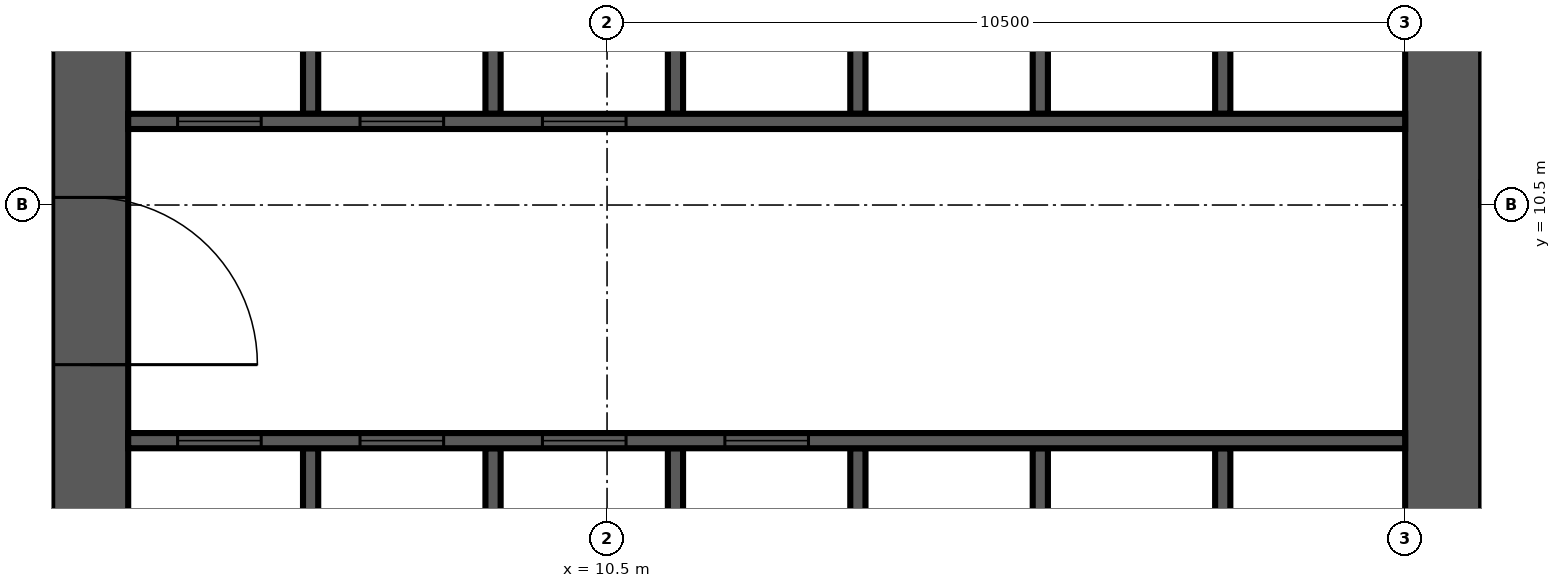
"""IFC4 building model, lengths in metres.
Left out: names, types, materials, properties, quantities, classifications, styles, units other than length and angle.
Written with IfcOpenShell. Run it as: python <this file> out.ifc"""

import sys

from ifc_helpers import new_model, si_unit, direction, frame, frame_2d, origin, place, context, subcontext, project, spatial, rectangle, extrude, source, transform, mapped, element, fill, save


model = new_model("IFC4")
c1 = context("Model", 3, precision=1e-05, world=origin(), true_north=direction((0.0, 1.0)))
c2 = subcontext(c1, "Body", "Model", "MODEL_VIEW")
j1 = project(units=[si_unit("LENGTHUNIT", "METRE"), si_unit("PLANEANGLEUNIT", "RADIAN")], contexts=[c1])
p1 = place(None, origin())
s1 = spatial("IfcSite", under=j1, at=p1, CompositionType="ELEMENT")
p2 = place(p1, origin())
s2 = spatial("IfcBuilding", under=s1, at=p2, CompositionType="ELEMENT")
p3 = place(p2, frame((0.0, 0.0, 103.5)))
s3 = spatial("IfcBuildingStorey", under=s2, at=p3, CompositionType="ELEMENT", Elevation=103.5)
p4 = place(p3, frame((3.7, 4.2, 0.0), z_axis=(0.0, 0.0, 1.0), x_axis=(0.0, 1.0, 0.0)))
e1 = element("IfcWall", 1, at=p4, inside=s3, PredefinedType="SHEAR", context=c2, shape_type="SweptSolid", body=[
    extrude(rectangle(XDim=17.8, YDim=1.0, at=frame_2d((8.9, 0.0))), origin(), (0.0, 0.0, 1.0), 4.2),
])
p5 = place(p4, frame((4.2, 0.0, 0.0)))
e2 = element("IfcOpeningElement", 2, at=p5, cuts=e1, PredefinedType="OPENING", context=c2, shape_type="SweptSolid", body=[
    extrude(rectangle(XDim=2.2, YDim=2.1, at=frame_2d((1.1, 1.05))), frame((0.0, 0.51, 0.0), z_axis=(0.0, -1.0, 0.0), x_axis=(1.0, 0.0, 0.0)), (0.0, 0.0, 1.0), 1.02),
])
p6 = place(p4, frame((10.95, 0.0, 0.0)))
e3 = element("IfcOpeningElement", 3, at=p6, cuts=e1, PredefinedType="OPENING", context=c2, shape_type="SweptSolid", body=[
    extrude(rectangle(XDim=0.9, YDim=2.1, at=frame_2d((0.45, 1.05))), frame((0.0, 0.51, 0.0), z_axis=(0.0, -1.0, 0.0), x_axis=(1.0, 0.0, 0.0)), (0.0, 0.0, 1.0), 1.02),
])
p7 = place(p3, frame((21.5, 4.2, 0.0), z_axis=(0.0, 0.0, 1.0), x_axis=(0.0, 1.0, 0.0)))
e4 = element("IfcWall", 4, at=p7, inside=s3, PredefinedType="SHEAR", context=c2, shape_type="SweptSolid", body=[
    extrude(rectangle(XDim=16.8, YDim=1.0, at=frame_2d((8.4, 0.0))), origin(), (0.0, 0.0, 1.0), 4.2),
])
m1 = source(origin(), c2, "Body", "SweptSolid", [
    extrude(rectangle(XDim=1.2, YDim=2.1, at=frame_2d((0.6, 1.05))), frame((0.0, 0.51, 0.0), z_axis=(0.0, -1.0, 0.0), x_axis=(1.0, 0.0, 0.0)), (0.0, 0.0, 1.0), 1.02),
])
p8 = place(p7, frame((14.7, 0.0, 0.0)))
e5 = element("IfcOpeningElement", 5, at=p8, cuts=e4, PredefinedType="OPENING", context=c2, shape_type="MappedRepresentation", body=[
    mapped(m1, transform((0.0, 0.0, 0.0), scale=1.0)),
])
m2 = source(origin(), c2, "Body", "SweptSolid", [
    extrude(rectangle(XDim=3.1, YDim=0.2, at=frame_2d((1.55, 0.0))), origin(), (0.0, 0.0, 1.0), 4.2),
])
for number, where, z_axis, x_axis in (
    (6, (6.6, 4.2, 0.0), (0.0, 0.0, 1.0), (0.0, 1.0, 0.0)),
    (7, (9.0, 4.2, 0.0), (0.0, 0.0, 1.0), (0.0, 1.0, 0.0)),
    (8, (11.4, 4.2, 0.0), (0.0, 0.0, 1.0), (0.0, 1.0, 0.0)),
    (9, (13.8, 4.2, 0.0), (0.0, 0.0, 1.0), (0.0, 1.0, 0.0)),
    (10, (16.2, 4.2, 0.0), (0.0, 0.0, 1.0), (0.0, 1.0, 0.0)),
    (11, (18.6, 4.2, 0.0), (0.0, 0.0, 1.0), (0.0, 1.0, 0.0)),
):
    element("IfcWall", number, at=place(p3, frame(where, z_axis=z_axis, x_axis=x_axis)), inside=s3, PredefinedType="SOLIDWALL", context=c2, shape_type="MappedRepresentation", body=[
        mapped(m2, transform((0.0, 0.0, 0.0), scale=1.0)),
    ])
m3 = source(origin(), c2, "Body", "SweptSolid", [
    extrude(rectangle(XDim=3.0, YDim=0.2, at=frame_2d((1.5, 0.0))), origin(), (0.0, 0.0, 1.0), 4.2),
])
for number, where, z_axis, x_axis in (
    (12, (6.6, 11.7, 0.0), (0.0, 0.0, 1.0), (0.0, 1.0, 0.0)),
    (13, (9.0, 11.7, 0.0), (0.0, 0.0, 1.0), (0.0, 1.0, 0.0)),
    (14, (11.4, 11.7, 0.0), (0.0, 0.0, 1.0), (0.0, 1.0, 0.0)),
    (15, (13.8, 11.7, 0.0), (0.0, 0.0, 1.0), (0.0, 1.0, 0.0)),
    (16, (16.2, 11.7, 0.0), (0.0, 0.0, 1.0), (0.0, 1.0, 0.0)),
    (17, (18.6, 11.7, 0.0), (0.0, 0.0, 1.0), (0.0, 1.0, 0.0)),
):
    element("IfcWall", number, at=place(p3, frame(where, z_axis=z_axis, x_axis=x_axis)), inside=s3, PredefinedType="SOLIDWALL", context=c2, shape_type="MappedRepresentation", body=[
        mapped(m3, transform((0.0, 0.0, 0.0), scale=1.0)),
    ])
m4 = source(origin(), c2, "Body", "SweptSolid", [
    extrude(rectangle(XDim=16.8, YDim=0.2, at=frame_2d((8.4, 0.0))), origin(), (0.0, 0.0, 1.0), 4.2),
])
p9 = place(p3, frame((4.2, 7.4, 0.0), z_axis=(0.0, 0.0, 1.0), x_axis=(1.0, 0.0, 0.0)))
e18 = element("IfcWall", 18, at=p9, inside=s3, PredefinedType="SOLIDWALL", context=c2, shape_type="MappedRepresentation", body=[
    mapped(m4, transform((0.0, 0.0, 0.0), scale=1.0)),
])
m5 = source(origin(), c2, "Body", "SweptSolid", [
    extrude(rectangle(XDim=1.1, YDim=2.1, at=frame_2d((0.55, 1.05))), frame((0.0, 0.11, 0.0), z_axis=(0.0, -1.0, 0.0), x_axis=(1.0, 0.0, 0.0)), (0.0, 0.0, 1.0), 0.22),
])
p10 = place(p9, frame((0.65, 0.0, 0.0)))
e19 = element("IfcOpeningElement", 19, at=p10, cuts=e18, PredefinedType="OPENING", context=c2, shape_type="MappedRepresentation", body=[
    mapped(m5, transform((0.0, 0.0, 0.0), scale=1.0)),
])
p11 = place(p9, frame((3.05, 0.0, 0.0)))
e20 = element("IfcOpeningElement", 20, at=p11, cuts=e18, PredefinedType="OPENING", context=c2, shape_type="MappedRepresentation", body=[
    mapped(m5, transform((0.0, 0.0, 0.0), scale=1.0)),
])
p12 = place(p9, frame((5.45, 0.0, 0.0)))
e21 = element("IfcOpeningElement", 21, at=p12, cuts=e18, PredefinedType="OPENING", context=c2, shape_type="MappedRepresentation", body=[
    mapped(m5, transform((0.0, 0.0, 0.0), scale=1.0)),
])
p13 = place(p9, frame((7.85, 0.0, 0.0)))
e22 = element("IfcOpeningElement", 22, at=p13, cuts=e18, PredefinedType="OPENING", context=c2, shape_type="MappedRepresentation", body=[
    mapped(m5, transform((0.0, 0.0, 0.0), scale=1.0)),
])
p14 = place(p3, frame((4.2, 11.6, 0.0), z_axis=(0.0, 0.0, 1.0), x_axis=(1.0, 0.0, 0.0)))
e23 = element("IfcWall", 23, at=p14, inside=s3, PredefinedType="SOLIDWALL", context=c2, shape_type="MappedRepresentation", body=[
    mapped(m4, transform((0.0, 0.0, 0.0), scale=1.0)),
])
p15 = place(p14, frame((0.65, 0.0, 0.0)))
e24 = element("IfcOpeningElement", 24, at=p15, cuts=e23, PredefinedType="OPENING", context=c2, shape_type="MappedRepresentation", body=[
    mapped(m5, transform((0.0, 0.0, 0.0), scale=1.0)),
])
p16 = place(p14, frame((3.05, 0.0, 0.0)))
e25 = element("IfcOpeningElement", 25, at=p16, cuts=e23, PredefinedType="OPENING", context=c2, shape_type="MappedRepresentation", body=[
    mapped(m5, transform((0.0, 0.0, 0.0), scale=1.0)),
])
p17 = place(p14, frame((5.45, 0.0, 0.0)))
e26 = element("IfcOpeningElement", 26, at=p17, cuts=e23, PredefinedType="OPENING", context=c2, shape_type="MappedRepresentation", body=[
    mapped(m5, transform((0.0, 0.0, 0.0), scale=1.0)),
])
m6 = source(origin(), c2, "Body", "SweptSolid", [
    extrude(rectangle(XDim=1.1, YDim=2.1, at=frame_2d((0.55, 1.05))), frame((0.0, 0.025, 0.0), z_axis=(0.0, -1.0, 0.0), x_axis=(1.0, 0.0, 0.0)), (0.0, 0.0, 1.0), 0.05),
])
p18 = place(p10, origin())
e27 = element("IfcDoor", 27, at=p18, inside=s3, OperationType="SLIDING_TO_LEFT", PredefinedType="DOOR", context=c2, shape_type="MappedRepresentation", body=[
    mapped(m6, transform((0.0, 0.0, 0.0), scale=1.0)),
])
fill(e19, e27)
p19 = place(p11, origin())
e28 = element("IfcDoor", 28, at=p19, inside=s3, OperationType="SLIDING_TO_LEFT", PredefinedType="DOOR", context=c2, shape_type="MappedRepresentation", body=[
    mapped(m6, transform((0.0, 0.0, 0.0), scale=1.0)),
])
fill(e20, e28)
p20 = place(p12, origin())
e29 = element("IfcDoor", 29, at=p20, inside=s3, OperationType="SLIDING_TO_LEFT", PredefinedType="DOOR", context=c2, shape_type="MappedRepresentation", body=[
    mapped(m6, transform((0.0, 0.0, 0.0), scale=1.0)),
])
fill(e21, e29)
p21 = place(p13, origin())
e30 = element("IfcDoor", 30, at=p21, inside=s3, OperationType="SLIDING_TO_LEFT", PredefinedType="DOOR", context=c2, shape_type="MappedRepresentation", body=[
    mapped(m6, transform((0.0, 0.0, 0.0), scale=1.0)),
])
fill(e22, e30)
p22 = place(p15, origin())
e31 = element("IfcDoor", 31, at=p22, inside=s3, OperationType="SLIDING_TO_LEFT", PredefinedType="DOOR", context=c2, shape_type="MappedRepresentation", body=[
    mapped(m6, transform((0.0, 0.0, 0.0), scale=1.0)),
])
fill(e24, e31)
p23 = place(p16, origin())
e32 = element("IfcDoor", 32, at=p23, inside=s3, OperationType="SLIDING_TO_LEFT", PredefinedType="DOOR", context=c2, shape_type="MappedRepresentation", body=[
    mapped(m6, transform((0.0, 0.0, 0.0), scale=1.0)),
])
fill(e25, e32)
p24 = place(p17, origin())
e33 = element("IfcDoor", 33, at=p24, inside=s3, OperationType="SLIDING_TO_LEFT", PredefinedType="DOOR", context=c2, shape_type="MappedRepresentation", body=[
    mapped(m6, transform((0.0, 0.0, 0.0), scale=1.0)),
])
fill(e26, e33)
m7 = source(origin(), c2, "Body", "SweptSolid", [
    extrude(rectangle(XDim=2.2, YDim=2.1, at=frame_2d((1.1, 1.05))), frame((0.0, 0.025, 0.0), z_axis=(0.0, -1.0, 0.0), x_axis=(1.0, 0.0, 0.0)), (0.0, 0.0, 1.0), 0.05),
])
p25 = place(p5, origin())
e34 = element("IfcDoor", 34, at=p25, inside=s3, OperationType="DOUBLE_DOOR_SINGLE_SWING", PredefinedType="DOOR", context=c2, shape_type="MappedRepresentation", body=[
    mapped(m7, transform((0.0, 0.0, 0.0), scale=1.0)),
])
fill(e2, e34)
save(model, sys.argv[1])
